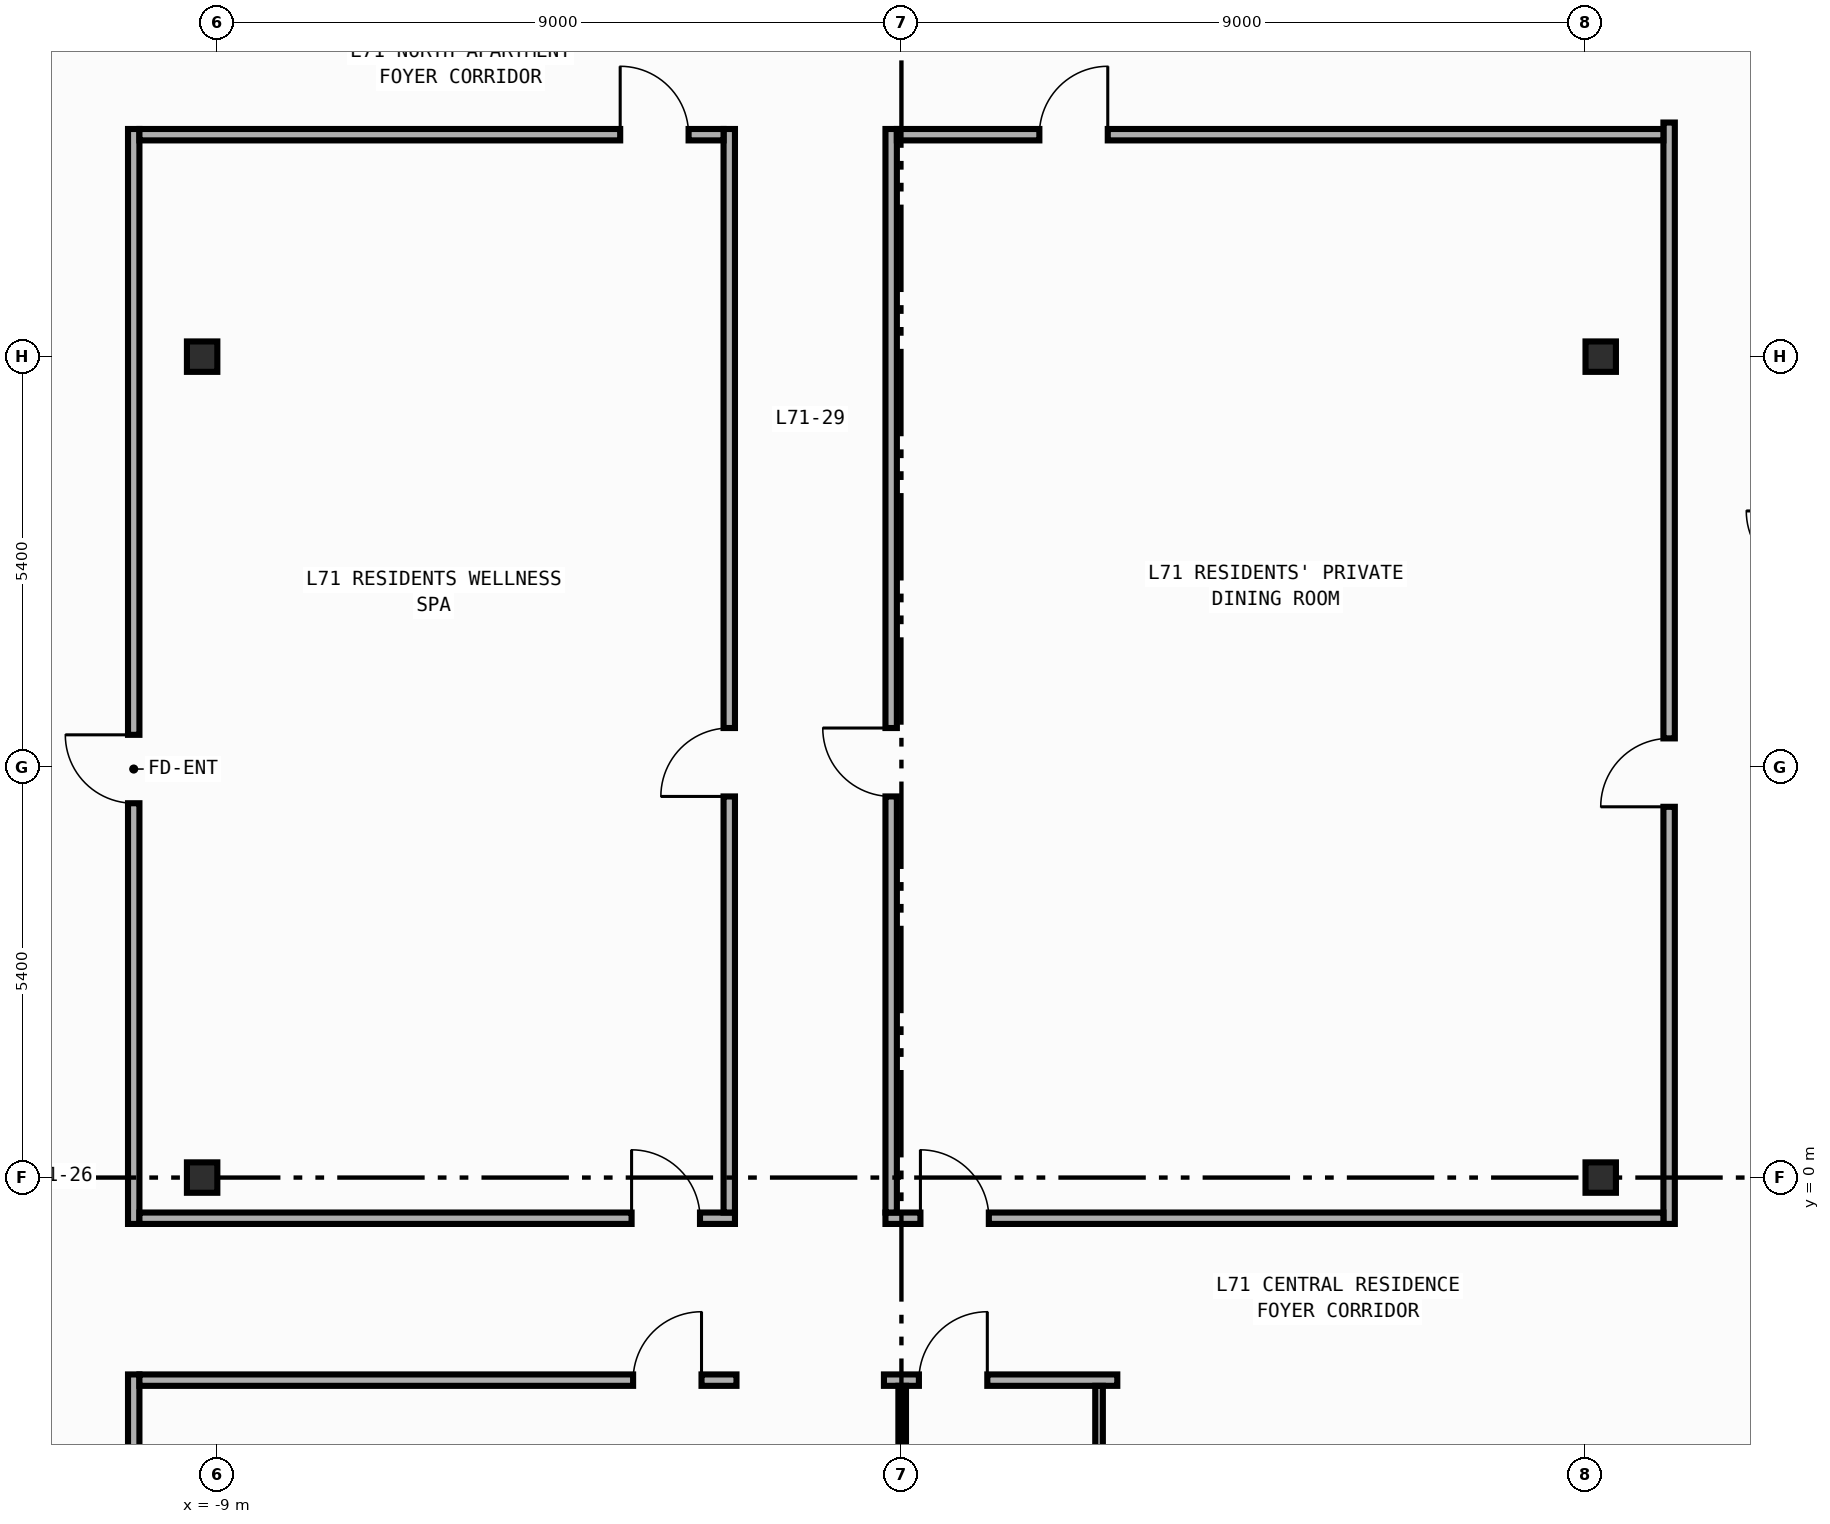
"""IFC4 building model, lengths in metres.
Left out: names, types, materials, properties, quantities, classifications, styles, units other than length and angle.
Written with IfcOpenShell. Run it as: python <this file> out.ifc"""

import sys

from ifc_helpers import new_model, si_unit, direction, frame, frame_2d, origin, origin_2d, place, context, subcontext, project, spatial, rectangle, i_section, extrude, element, fill, save


model = new_model("IFC4")
c1 = context("Model", 3, precision=1e-05, world=origin(), true_north=direction((0.0, 1.0)))
c2 = subcontext(c1, "Body", "Model", "MODEL_VIEW")
j1 = project(units=[si_unit("LENGTHUNIT", "METRE"), si_unit("PLANEANGLEUNIT", "RADIAN")], contexts=[c1])
p1 = place(None, origin())
s1 = spatial("IfcSite", under=j1, at=p1, CompositionType="ELEMENT")
p2 = place(p1, origin())
s2 = spatial("IfcBuilding", under=s1, at=p2, CompositionType="ELEMENT")
p3 = place(p2, frame((0.0, 0.0, 296.6)))
s3 = spatial("IfcBuildingStorey", under=s2, at=p3, CompositionType="ELEMENT", Elevation=296.6)
for number, where, z_axis, x_axis in (
    (1, (-9.2, 0.0, 0.0), (0.0, 0.0, 1.0), (1.0, 0.0, 0.0)),
    (2, (-9.2, 10.8, 0.0), (0.0, 0.0, 1.0), (1.0, 0.0, 0.0)),
    (3, (9.2, 0.0, 0.0), (0.0, 0.0, 1.0), (1.0, 0.0, 0.0)),
    (4, (9.2, 10.8, 0.0), (0.0, 0.0, 1.0), (1.0, 0.0, 0.0)),
):
    element("IfcColumn", number, at=place(p3, frame(where, z_axis=z_axis, x_axis=x_axis)), inside=s3, PredefinedType="COLUMN", context=c2, shape_type="SweptSolid", body=[
        extrude(i_section(OverallWidth=0.4, OverallDepth=0.4, WebThickness=0.013, FlangeThickness=0.021, FilletRadius=0.022, at=origin_2d()), origin(), (0.0, 0.0, 1.0), 3.8),
    ])
p4 = place(p3, frame((-10.1, -0.61, 0.0), z_axis=(0.0, 0.0, 1.0), x_axis=(0.0, 1.0, 0.0)))
e5 = element("IfcWall", 5, at=p4, inside=s3, PredefinedType="PARTITIONING", context=c2, shape_type="SweptSolid", body=[
    extrude(rectangle(XDim=14.405, YDim=0.15, at=frame_2d((7.203, 0.0))), origin(), (0.0, 0.0, 1.0), 3.54),
])
p5 = place(p4, frame((5.535, 0.0, 0.0)))
e6 = element("IfcOpeningElement", 6, at=p5, cuts=e5, PredefinedType="OPENING", context=c2, shape_type="SweptSolid", body=[
    extrude(rectangle(XDim=0.9, YDim=2.15, at=frame_2d((0.45, 1.075))), frame((0.0, 0.085, 0.0), z_axis=(0.0, -1.0, 0.0), x_axis=(1.0, 0.0, 0.0)), (0.0, 0.0, 1.0), 0.17),
])
p6 = place(p3, frame((-10.1, -13.795, 0.0), z_axis=(0.0, 0.0, 1.0), x_axis=(0.0, 1.0, 0.0)))
e7 = element("IfcWall", 7, at=p6, inside=s3, PredefinedType="PARTITIONING", context=c2, shape_type="SweptSolid", body=[
    extrude(rectangle(XDim=11.205, YDim=0.15, at=frame_2d((5.603, 0.0))), origin(), (0.0, 0.0, 1.0), 3.54),
])
p7 = place(p6, frame((8.009, 0.0, 0.0)))
e8 = element("IfcOpeningElement", 8, at=p7, cuts=e7, PredefinedType="OPENING", context=c2, shape_type="SweptSolid", body=[
    extrude(rectangle(XDim=0.9, YDim=2.15, at=frame_2d((0.45, 1.075))), frame((0.0, 0.085, 0.0), z_axis=(0.0, -1.0, 0.0), x_axis=(1.0, 0.0, 0.0)), (0.0, 0.0, 1.0), 0.17),
])
p8 = place(p3, frame((10.1, -0.61, 0.0), z_axis=(0.0, 0.0, 1.0), x_axis=(0.0, 1.0, 0.0)))
e9 = element("IfcWall", 9, at=p8, inside=s3, PredefinedType="PARTITIONING", context=c2, shape_type="SweptSolid", body=[
    extrude(rectangle(XDim=14.49, YDim=0.15, at=frame_2d((7.245, 0.0))), origin(), (0.0, 0.0, 1.0), 3.54),
])
p9 = place(p8, frame((5.488, 0.0, 0.0)))
e10 = element("IfcOpeningElement", 10, at=p9, cuts=e9, PredefinedType="OPENING", context=c2, shape_type="SweptSolid", body=[
    extrude(rectangle(XDim=0.9, YDim=2.15, at=frame_2d((0.45, 1.075))), frame((0.0, 0.085, 0.0), z_axis=(0.0, -1.0, 0.0), x_axis=(1.0, 0.0, 0.0)), (0.0, 0.0, 1.0), 0.17),
])
p10 = place(p3, frame((-10.025, -0.535, 0.0), z_axis=(0.0, 0.0, 1.0), x_axis=(1.0, 0.0, 0.0)))
e11 = element("IfcWall", 11, at=p10, inside=s3, PredefinedType="PARTITIONING", context=c2, shape_type="SweptSolid", body=[
    extrude(rectangle(XDim=7.835, YDim=0.15, at=frame_2d((3.917, 0.0))), origin(), (0.0, 0.0, 1.0), 3.54),
])
p11 = place(p10, frame((6.475, 0.0, 0.0)))
e12 = element("IfcOpeningElement", 12, at=p11, cuts=e11, PredefinedType="OPENING", context=c2, shape_type="SweptSolid", body=[
    extrude(rectangle(XDim=0.9, YDim=2.15, at=frame_2d((0.45, 1.075))), frame((0.0, 0.085, 0.0), z_axis=(0.0, -1.0, 0.0), x_axis=(1.0, 0.0, 0.0)), (0.0, 0.0, 1.0), 0.17),
])
p12 = place(p3, frame((-10.025, -2.665, 0.0), z_axis=(0.0, 0.0, 1.0), x_axis=(1.0, 0.0, 0.0)))
e13 = element("IfcWall", 13, at=p12, inside=s3, PredefinedType="PARTITIONING", context=c2, shape_type="SweptSolid", body=[
    extrude(rectangle(XDim=7.855, YDim=0.15, at=frame_2d((3.927, 0.0))), origin(), (0.0, 0.0, 1.0), 3.54),
])
p13 = place(p12, frame((6.495, 0.0, 0.0)))
e14 = element("IfcOpeningElement", 14, at=p13, cuts=e13, PredefinedType="OPENING", context=c2, shape_type="SweptSolid", body=[
    extrude(rectangle(XDim=0.9, YDim=2.15, at=frame_2d((0.45, 1.075))), frame((0.0, 0.085, 0.0), z_axis=(0.0, -1.0, 0.0), x_axis=(1.0, 0.0, 0.0)), (0.0, 0.0, 1.0), 0.17),
])
p14 = place(p3, frame((-0.21, -0.535, 0.0), z_axis=(0.0, 0.0, 1.0), x_axis=(1.0, 0.0, 0.0)))
e15 = element("IfcWall", 15, at=p14, inside=s3, PredefinedType="PARTITIONING", context=c2, shape_type="SweptSolid", body=[
    extrude(rectangle(XDim=10.235, YDim=0.15, at=frame_2d((5.117, 0.0))), origin(), (0.0, 0.0, 1.0), 3.54),
])
p15 = place(p14, frame((0.46, 0.0, 0.0)))
e16 = element("IfcOpeningElement", 16, at=p15, cuts=e15, PredefinedType="OPENING", context=c2, shape_type="SweptSolid", body=[
    extrude(rectangle(XDim=0.9, YDim=2.15, at=frame_2d((0.45, 1.075))), frame((0.0, 0.085, 0.0), z_axis=(0.0, -1.0, 0.0), x_axis=(1.0, 0.0, 0.0)), (0.0, 0.0, 1.0), 0.17),
])
p16 = place(p3, frame((-0.23, -2.665, 0.0), z_axis=(0.0, 0.0, 1.0), x_axis=(1.0, 0.0, 0.0)))
e17 = element("IfcWall", 17, at=p16, inside=s3, PredefinedType="PARTITIONING", context=c2, shape_type="SweptSolid", body=[
    extrude(rectangle(XDim=3.07, YDim=0.15, at=frame_2d((1.535, 0.0))), origin(), (0.0, 0.0, 1.0), 3.54),
])
p17 = place(p16, frame((0.46, 0.0, 0.0)))
e18 = element("IfcOpeningElement", 18, at=p17, cuts=e17, PredefinedType="OPENING", context=c2, shape_type="SweptSolid", body=[
    extrude(rectangle(XDim=0.9, YDim=2.15, at=frame_2d((0.45, 1.075))), frame((0.0, 0.085, 0.0), z_axis=(0.0, -1.0, 0.0), x_axis=(1.0, 0.0, 0.0)), (0.0, 0.0, 1.0), 0.17),
])
p18 = place(p3, frame((-2.265, -0.46, 0.0), z_axis=(0.0, 0.0, 1.0), x_axis=(0.0, 1.0, 0.0)))
e19 = element("IfcWall", 19, at=p18, inside=s3, PredefinedType="PARTITIONING", context=c2, shape_type="SweptSolid", body=[
    extrude(rectangle(XDim=14.255, YDim=0.15, at=frame_2d((7.127, 0.0))), origin(), (0.0, 0.0, 1.0), 3.54),
])
p19 = place(p18, frame((5.474, 0.0, 0.0)))
e20 = element("IfcOpeningElement", 20, at=p19, cuts=e19, PredefinedType="OPENING", context=c2, shape_type="SweptSolid", body=[
    extrude(rectangle(XDim=0.9, YDim=2.15, at=frame_2d((0.45, 1.075))), frame((0.0, 0.085, 0.0), z_axis=(0.0, -1.0, 0.0), x_axis=(1.0, 0.0, 0.0)), (0.0, 0.0, 1.0), 0.17),
])
p20 = place(p3, frame((-0.135, -0.46, 0.0), z_axis=(0.0, 0.0, 1.0), x_axis=(0.0, 1.0, 0.0)))
e21 = element("IfcWall", 21, at=p20, inside=s3, PredefinedType="PARTITIONING", context=c2, shape_type="SweptSolid", body=[
    extrude(rectangle(XDim=14.255, YDim=0.15, at=frame_2d((7.127, 0.0))), origin(), (0.0, 0.0, 1.0), 3.54),
])
p21 = place(p20, frame((5.474, 0.0, 0.0)))
e22 = element("IfcOpeningElement", 22, at=p21, cuts=e21, PredefinedType="OPENING", context=c2, shape_type="SweptSolid", body=[
    extrude(rectangle(XDim=0.9, YDim=2.15, at=frame_2d((0.45, 1.075))), frame((0.0, 0.085, 0.0), z_axis=(0.0, -1.0, 0.0), x_axis=(1.0, 0.0, 0.0)), (0.0, 0.0, 1.0), 0.17),
])
p22 = place(p3, frame((-10.025, 13.72, 0.0), z_axis=(0.0, 0.0, 1.0), x_axis=(1.0, 0.0, 0.0)))
e23 = element("IfcWall", 23, at=p22, inside=s3, PredefinedType="PARTITIONING", context=c2, shape_type="SweptSolid", body=[
    extrude(rectangle(XDim=7.685, YDim=0.15, at=frame_2d((3.842, 0.0))), origin(), (0.0, 0.0, 1.0), 3.54),
])
p23 = place(p22, frame((6.325, 0.0, 0.0)))
e24 = element("IfcOpeningElement", 24, at=p23, cuts=e23, PredefinedType="OPENING", context=c2, shape_type="SweptSolid", body=[
    extrude(rectangle(XDim=0.9, YDim=2.15, at=frame_2d((0.45, 1.075))), frame((0.0, 0.085, 0.0), z_axis=(0.0, -1.0, 0.0), x_axis=(1.0, 0.0, 0.0)), (0.0, 0.0, 1.0), 0.17),
])
p24 = place(p3, frame((-0.06, 13.72, 0.0), z_axis=(0.0, 0.0, 1.0), x_axis=(1.0, 0.0, 0.0)))
e25 = element("IfcWall", 25, at=p24, inside=s3, PredefinedType="PARTITIONING", context=c2, shape_type="SweptSolid", body=[
    extrude(rectangle(XDim=10.085, YDim=0.15, at=frame_2d((5.042, 0.0))), origin(), (0.0, 0.0, 1.0), 3.54),
])
p25 = place(p24, frame((1.875, 0.0, 0.0)))
e26 = element("IfcOpeningElement", 26, at=p25, cuts=e25, PredefinedType="OPENING", context=c2, shape_type="SweptSolid", body=[
    extrude(rectangle(XDim=0.9, YDim=2.15, at=frame_2d((0.45, 1.075))), frame((0.0, 0.085, 0.0), z_axis=(0.0, -1.0, 0.0), x_axis=(1.0, 0.0, 0.0)), (0.0, 0.0, 1.0), 0.17),
])
for number, where, z_axis, x_axis in (
    (27, (2.6, -2.74, 0.0), (0.0, 0.0, 1.0), (0.0, -1.0, 0.0)),
    (28, (0.01, -5.31, 0.0), (0.0, 0.0, 1.0), (0.0, 1.0, 0.0)),
):
    element("IfcWall", number, at=place(p3, frame(where, z_axis=z_axis, x_axis=x_axis)), inside=s3, PredefinedType="PARTITIONING", context=c2, shape_type="SweptSolid", body=[
        extrude(rectangle(XDim=2.57, YDim=0.1, at=frame_2d((1.285, 0.0))), origin(), (0.0, 0.0, 1.0), 3.54),
    ])
p26 = place(p5, origin())
e29 = element("IfcDoor", 29, at=p26, inside=s3, OperationType="SINGLE_SWING_RIGHT", PredefinedType="DOOR", context=c2, shape_type="SweptSolid", body=[
    extrude(rectangle(XDim=0.9, YDim=2.15, at=frame_2d((0.45, 1.075))), frame((0.0, 0.025, 0.0), z_axis=(0.0, -1.0, 0.0), x_axis=(1.0, 0.0, 0.0)), (0.0, 0.0, 1.0), 0.05),
])
fill(e6, e29)
p27 = place(p9, origin())
e30 = element("IfcDoor", 30, at=p27, inside=s3, OperationType="SINGLE_SWING_LEFT", PredefinedType="DOOR", context=c2, shape_type="SweptSolid", body=[
    extrude(rectangle(XDim=0.9, YDim=2.15, at=frame_2d((0.45, 1.075))), frame((0.0, 0.025, 0.0), z_axis=(0.0, -1.0, 0.0), x_axis=(1.0, 0.0, 0.0)), (0.0, 0.0, 1.0), 0.05),
])
fill(e10, e30)
p28 = place(p11, origin())
e31 = element("IfcDoor", 31, at=p28, inside=s3, OperationType="SINGLE_SWING_LEFT", PredefinedType="DOOR", context=c2, shape_type="SweptSolid", body=[
    extrude(rectangle(XDim=0.9, YDim=2.15, at=frame_2d((0.45, 1.075))), frame((0.0, 0.025, 0.0), z_axis=(0.0, -1.0, 0.0), x_axis=(1.0, 0.0, 0.0)), (0.0, 0.0, 1.0), 0.05),
])
fill(e12, e31)
p29 = place(p13, origin())
e32 = element("IfcDoor", 32, at=p29, inside=s3, OperationType="SINGLE_SWING_RIGHT", PredefinedType="DOOR", context=c2, shape_type="SweptSolid", body=[
    extrude(rectangle(XDim=0.9, YDim=2.15, at=frame_2d((0.45, 1.075))), frame((0.0, 0.025, 0.0), z_axis=(0.0, -1.0, 0.0), x_axis=(1.0, 0.0, 0.0)), (0.0, 0.0, 1.0), 0.05),
])
fill(e14, e32)
p30 = place(p15, origin())
e33 = element("IfcDoor", 33, at=p30, inside=s3, OperationType="SINGLE_SWING_LEFT", PredefinedType="DOOR", context=c2, shape_type="SweptSolid", body=[
    extrude(rectangle(XDim=0.9, YDim=2.15, at=frame_2d((0.45, 1.075))), frame((0.0, 0.025, 0.0), z_axis=(0.0, -1.0, 0.0), x_axis=(1.0, 0.0, 0.0)), (0.0, 0.0, 1.0), 0.05),
])
fill(e16, e33)
p31 = place(p17, origin())
e34 = element("IfcDoor", 34, at=p31, inside=s3, OperationType="SINGLE_SWING_RIGHT", PredefinedType="DOOR", context=c2, shape_type="SweptSolid", body=[
    extrude(rectangle(XDim=0.9, YDim=2.15, at=frame_2d((0.45, 1.075))), frame((0.0, 0.025, 0.0), z_axis=(0.0, -1.0, 0.0), x_axis=(1.0, 0.0, 0.0)), (0.0, 0.0, 1.0), 0.05),
])
fill(e18, e34)
p32 = place(p19, origin())
e35 = element("IfcDoor", 35, at=p32, inside=s3, OperationType="SINGLE_SWING_LEFT", PredefinedType="DOOR", context=c2, shape_type="SweptSolid", body=[
    extrude(rectangle(XDim=0.9, YDim=2.15, at=frame_2d((0.45, 1.075))), frame((0.0, 0.025, 0.0), z_axis=(0.0, -1.0, 0.0), x_axis=(1.0, 0.0, 0.0)), (0.0, 0.0, 1.0), 0.05),
])
fill(e20, e35)
p33 = place(p21, origin())
e36 = element("IfcDoor", 36, at=p33, inside=s3, OperationType="SINGLE_SWING_RIGHT", PredefinedType="DOOR", context=c2, shape_type="SweptSolid", body=[
    extrude(rectangle(XDim=0.9, YDim=2.15, at=frame_2d((0.45, 1.075))), frame((0.0, 0.025, 0.0), z_axis=(0.0, -1.0, 0.0), x_axis=(1.0, 0.0, 0.0)), (0.0, 0.0, 1.0), 0.05),
])
fill(e22, e36)
p34 = place(p23, origin())
e37 = element("IfcDoor", 37, at=p34, inside=s3, OperationType="SINGLE_SWING_LEFT", PredefinedType="DOOR", context=c2, shape_type="SweptSolid", body=[
    extrude(rectangle(XDim=0.9, YDim=2.15, at=frame_2d((0.45, 1.075))), frame((0.0, 0.025, 0.0), z_axis=(0.0, -1.0, 0.0), x_axis=(1.0, 0.0, 0.0)), (0.0, 0.0, 1.0), 0.05),
])
fill(e24, e37)
p35 = place(p25, origin())
e38 = element("IfcDoor", 38, at=p35, inside=s3, OperationType="SINGLE_SWING_RIGHT", PredefinedType="DOOR", context=c2, shape_type="SweptSolid", body=[
    extrude(rectangle(XDim=0.9, YDim=2.15, at=frame_2d((0.45, 1.075))), frame((0.0, 0.025, 0.0), z_axis=(0.0, -1.0, 0.0), x_axis=(1.0, 0.0, 0.0)), (0.0, 0.0, 1.0), 0.05),
])
fill(e26, e38)
save(model, sys.argv[1])
